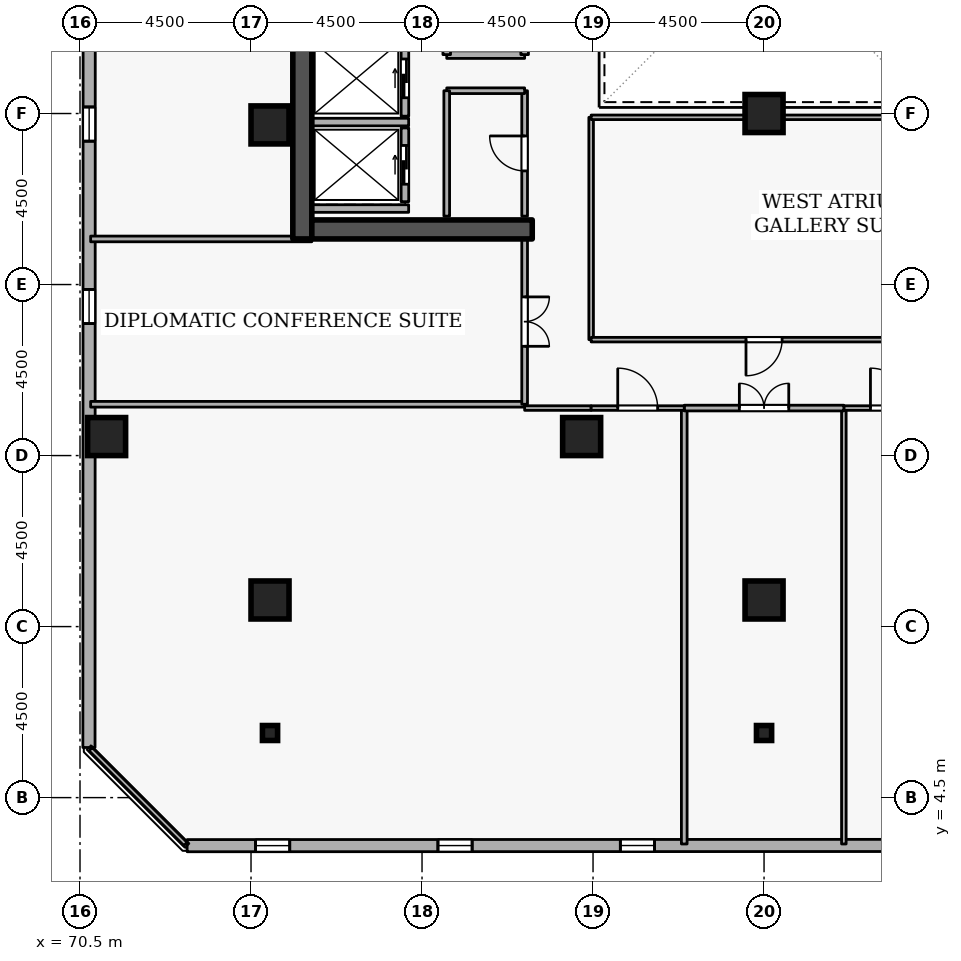
"""IFC4 building model, lengths in metres.
Left out: names, types, materials, properties, quantities, classifications, styles, units other than length and angle.
Written with IfcOpenShell. Run it as: python <this file> out.ifc"""

import sys

from ifc_helpers import new_model, si_unit, direction, frame, frame_2d, origin, origin_2d, place, context, subcontext, project, spatial, rectangle, i_section, extrude, element, fill, save


model = new_model("IFC4")
c1 = context("Model", 3, precision=1e-05, world=origin(), true_north=direction((0.0, 1.0)))
c2 = subcontext(c1, "Body", "Model", "MODEL_VIEW")
j1 = project(units=[si_unit("LENGTHUNIT", "METRE"), si_unit("PLANEANGLEUNIT", "RADIAN")], contexts=[c1])
p1 = place(None, origin())
s1 = spatial("IfcSite", under=j1, at=p1, CompositionType="ELEMENT")
p2 = place(p1, origin())
s2 = spatial("IfcBuilding", under=s1, at=p2, CompositionType="ELEMENT")
p3 = place(p2, frame((0.0, 0.0, 233.1)))
s3 = spatial("IfcBuildingStorey", under=s2, at=p3, CompositionType="ELEMENT", Elevation=233.1)
p4 = place(p3, frame((76.35, 19.2, 0.0), z_axis=(0.0, 0.0, 1.0), x_axis=(0.0, 1.0, 0.0)))
e1 = element("IfcWall", 1, at=p4, inside=s3, PredefinedType="SHEAR", context=c2, shape_type="SweptSolid", body=[
    extrude(rectangle(XDim=15.6, YDim=0.5, at=frame_2d((7.8, 0.0))), origin(), (0.0, 0.0, 1.0), 3.6),
])
p5 = place(p3, frame((76.6, 19.45, 0.0), z_axis=(0.0, 0.0, 1.0), x_axis=(1.0, 0.0, 0.0)))
e2 = element("IfcWall", 2, at=p5, inside=s3, PredefinedType="SHEAR", context=c2, shape_type="SweptSolid", body=[
    extrude(rectangle(XDim=5.8, YDim=0.5, at=frame_2d((2.9, 0.0))), origin(), (0.0, 0.0, 1.0), 3.6),
])
for number, where, z_axis, x_axis in (
    (3, (71.2, 14.0, 0.0), (0.0, 0.0, 1.0), (1.0, 0.0, 0.0)),
    (4, (88.5, 9.7, 0.0), (0.0, 0.0, 1.0), (1.0, 0.0, 0.0)),
    (5, (75.5, 9.7, 0.0), (0.0, 0.0, 1.0), (1.0, 0.0, 0.0)),
    (6, (83.7, 14.0, 0.0), (0.0, 0.0, 1.0), (1.0, 0.0, 0.0)),
    (7, (75.5, 22.2, 0.0), (0.0, 0.0, 1.0), (1.0, 0.0, 0.0)),
    (8, (88.5, 22.5, 0.0), (0.0, 0.0, 1.0), (1.0, 0.0, 0.0)),
):
    element("IfcColumn", number, at=place(p3, frame(where, z_axis=z_axis, x_axis=x_axis)), inside=s3, PredefinedType="COLUMN", context=c2, shape_type="SweptSolid", body=[
        extrude(rectangle(XDim=1.0, YDim=1.0, at=origin_2d()), origin(), (0.0, 0.0, 1.0), 3.6),
    ])
for number, where, z_axis, x_axis in (
    (9, (88.5, 6.2, 0.0), (0.0, 0.0, 1.0), (1.0, 0.0, 0.0)),
    (10, (75.5, 6.2, 0.0), (0.0, 0.0, 1.0), (1.0, 0.0, 0.0)),
):
    element("IfcColumn", number, at=place(p3, frame(where, z_axis=z_axis, x_axis=x_axis)), inside=s3, PredefinedType="COLUMN", context=c2, shape_type="SweptSolid", body=[
        extrude(i_section(OverallWidth=0.399, OverallDepth=0.394, WebThickness=0.023, FlangeThickness=0.037, FilletRadius=0.015, at=origin_2d()), origin(), (0.0, 0.0, 1.0), 3.6),
    ])
p6 = place(p3, frame((73.319, 3.235, 0.0), z_axis=(0.0, 0.0, 1.0), x_axis=(0.999999944762, 0.000332378036, 0.0)))
e11 = element("IfcWall", 11, at=p6, inside=s3, PredefinedType="STANDARD", context=c2, shape_type="SweptSolid", body=[
    extrude(rectangle(XDim=33.054, YDim=0.32, at=frame_2d((16.527, 0.0))), origin(), (0.0, 0.0, 1.0), 2.7),
])
p7 = place(p6, frame((1.8, 0.0, 0.72)))
e12 = element("IfcOpeningElement", 12, at=p7, cuts=e11, PredefinedType="OPENING", context=c2, shape_type="SweptSolid", body=[
    extrude(rectangle(XDim=0.9, YDim=1.75, at=frame_2d((0.45, 0.875))), frame((0.0, 0.17, 0.0), z_axis=(0.0, -1.0, 0.0), x_axis=(1.0, 0.0, 0.0)), (0.0, 0.0, 1.0), 0.34),
])
p8 = place(p6, frame((6.6, 0.0, 0.72)))
e13 = element("IfcOpeningElement", 13, at=p8, cuts=e11, PredefinedType="OPENING", context=c2, shape_type="SweptSolid", body=[
    extrude(rectangle(XDim=0.9, YDim=1.75, at=frame_2d((0.45, 0.875))), frame((0.0, 0.17, 0.0), z_axis=(0.0, -1.0, 0.0), x_axis=(1.0, 0.0, 0.0)), (0.0, 0.0, 1.0), 0.34),
])
p9 = place(p6, frame((11.4, 0.0, 0.72)))
e14 = element("IfcOpeningElement", 14, at=p9, cuts=e11, PredefinedType="OPENING", context=c2, shape_type="SweptSolid", body=[
    extrude(rectangle(XDim=0.9, YDim=1.75, at=frame_2d((0.45, 0.875))), frame((0.0, 0.17, 0.0), z_axis=(0.0, -1.0, 0.0), x_axis=(1.0, 0.0, 0.0)), (0.0, 0.0, 1.0), 0.34),
])
p10 = place(p6, frame((21.0, 0.0, 0.72)))
e15 = element("IfcOpeningElement", 15, at=p10, cuts=e11, PredefinedType="OPENING", context=c2, shape_type="SweptSolid", body=[
    extrude(rectangle(XDim=0.9, YDim=1.75, at=frame_2d((0.45, 0.875))), frame((0.0, 0.17, 0.0), z_axis=(0.0, -1.0, 0.0), x_axis=(1.0, 0.0, 0.0)), (0.0, 0.0, 1.0), 0.34),
])
p11 = place(p6, frame((25.8, 0.0, 0.72)))
e16 = element("IfcOpeningElement", 16, at=p11, cuts=e11, PredefinedType="OPENING", context=c2, shape_type="SweptSolid", body=[
    extrude(rectangle(XDim=0.9, YDim=1.75, at=frame_2d((0.45, 0.875))), frame((0.0, 0.17, 0.0), z_axis=(0.0, -1.0, 0.0), x_axis=(1.0, 0.0, 0.0)), (0.0, 0.0, 1.0), 0.34),
])
p12 = place(p3, frame((70.746, 38.872, 0.0), z_axis=(0.0, 0.0, 1.0), x_axis=(-0.000332378036, -0.999999944762, 0.0)))
e17 = element("IfcWall", 17, at=p12, inside=s3, PredefinedType="STANDARD", context=c2, shape_type="SweptSolid", body=[
    extrude(rectangle(XDim=33.054, YDim=0.32, at=frame_2d((16.527, 0.0))), origin(), (0.0, 0.0, 1.0), 2.7),
])
p13 = place(p12, frame((1.8, 0.0, 0.72)))
e18 = element("IfcOpeningElement", 18, at=p13, cuts=e17, PredefinedType="OPENING", context=c2, shape_type="SweptSolid", body=[
    extrude(rectangle(XDim=0.9, YDim=1.75, at=frame_2d((0.45, 0.875))), frame((0.0, 0.17, 0.0), z_axis=(0.0, -1.0, 0.0), x_axis=(1.0, 0.0, 0.0)), (0.0, 0.0, 1.0), 0.34),
])
p14 = place(p12, frame((6.6, 0.0, 0.72)))
e19 = element("IfcOpeningElement", 19, at=p14, cuts=e17, PredefinedType="OPENING", context=c2, shape_type="SweptSolid", body=[
    extrude(rectangle(XDim=0.9, YDim=1.75, at=frame_2d((0.45, 0.875))), frame((0.0, 0.17, 0.0), z_axis=(0.0, -1.0, 0.0), x_axis=(1.0, 0.0, 0.0)), (0.0, 0.0, 1.0), 0.34),
])
p15 = place(p12, frame((16.2, 0.0, 0.72)))
e20 = element("IfcOpeningElement", 20, at=p15, cuts=e17, PredefinedType="OPENING", context=c2, shape_type="SweptSolid", body=[
    extrude(rectangle(XDim=0.9, YDim=1.75, at=frame_2d((0.45, 0.875))), frame((0.0, 0.17, 0.0), z_axis=(0.0, -1.0, 0.0), x_axis=(1.0, 0.0, 0.0)), (0.0, 0.0, 1.0), 0.34),
])
p16 = place(p12, frame((21.0, 0.0, 0.72)))
e21 = element("IfcOpeningElement", 21, at=p16, cuts=e17, PredefinedType="OPENING", context=c2, shape_type="SweptSolid", body=[
    extrude(rectangle(XDim=0.9, YDim=1.75, at=frame_2d((0.45, 0.875))), frame((0.0, 0.17, 0.0), z_axis=(0.0, -1.0, 0.0), x_axis=(1.0, 0.0, 0.0)), (0.0, 0.0, 1.0), 0.34),
])
p17 = place(p3, frame((79.05, 22.43, 0.0), z_axis=(0.0, 0.0, 1.0), x_axis=(0.0, 1.0, 0.0)))
e22 = element("IfcWall", 22, at=p17, inside=s3, PredefinedType="STANDARD", context=c2, shape_type="SweptSolid", body=[
    extrude(rectangle(XDim=1.99, YDim=0.2, at=frame_2d((0.995, 0.0))), origin(), (0.0, 0.0, 1.0), 3.34),
])
p18 = place(p17, frame((0.485, 0.0, 0.0)))
e23 = element("IfcOpeningElement", 23, at=p18, cuts=e22, PredefinedType="OPENING", context=c2, shape_type="SweptSolid", body=[
    extrude(rectangle(XDim=1.02, YDim=2.06, at=frame_2d((0.51, 1.03))), frame((0.0, 0.11, 0.0), z_axis=(0.0, -1.0, 0.0), x_axis=(1.0, 0.0, 0.0)), (0.0, 0.0, 1.0), 0.22),
])
p19 = place(p3, frame((79.05, 20.18, 0.0), z_axis=(0.0, 0.0, 1.0), x_axis=(0.0, 1.0, 0.0)))
e24 = element("IfcWall", 24, at=p19, inside=s3, PredefinedType="STANDARD", context=c2, shape_type="SweptSolid", body=[
    extrude(rectangle(XDim=1.94, YDim=0.2, at=frame_2d((0.97, 0.0))), origin(), (0.0, 0.0, 1.0), 3.34),
])
p20 = place(p19, frame((0.46, 0.0, 0.0)))
e25 = element("IfcOpeningElement", 25, at=p20, cuts=e24, PredefinedType="OPENING", context=c2, shape_type="SweptSolid", body=[
    extrude(rectangle(XDim=1.02, YDim=2.06, at=frame_2d((0.51, 1.03))), frame((0.0, 0.11, 0.0), z_axis=(0.0, -1.0, 0.0), x_axis=(1.0, 0.0, 0.0)), (0.0, 0.0, 1.0), 0.22),
])
for number, where, z_axis, x_axis in (
    (26, (76.612, 22.275, 0.0), (0.0, 0.0, 1.0), (1.0, 0.0, 0.0)),
    (27, (76.612, 20.0, 0.0), (0.0, 0.0, 1.0), (1.0, 0.0, 0.0)),
):
    element("IfcWall", number, at=place(p3, frame(where, z_axis=z_axis, x_axis=x_axis)), inside=s3, PredefinedType="STANDARD", context=c2, shape_type="SweptSolid", body=[
        extrude(rectangle(XDim=2.536, YDim=0.2, at=frame_2d((1.268, 0.0))), origin(), (0.0, 0.0, 1.0), 3.34),
    ])
p21 = place(p3, frame((80.15, 24.05, 0.0), z_axis=(0.0, 0.0, 1.0), x_axis=(1.0, 0.0, 0.0)))
e28 = element("IfcWall", 28, at=p21, inside=s3, PredefinedType="STANDARD", context=c2, shape_type="SweptSolid", body=[
    extrude(rectangle(XDim=2.05, YDim=0.2, at=frame_2d((1.025, 0.0))), origin(), (0.0, 0.0, 1.0), 3.34),
])
p22 = place(p3, frame((82.2, 24.05, 0.0), z_axis=(0.0, 0.0, 1.0), x_axis=(0.0, 1.0, 0.0)))
e29 = element("IfcWall", 29, at=p22, inside=s3, PredefinedType="STANDARD", context=c2, shape_type="SweptSolid", body=[
    extrude(rectangle(XDim=1.8, YDim=0.2, at=frame_2d((0.9, 0.0))), origin(), (0.0, 0.0, 1.0), 3.34),
])
p23 = place(p22, frame((0.46, 0.0, 0.0)))
e30 = element("IfcOpeningElement", 30, at=p23, cuts=e29, PredefinedType="OPENING", context=c2, shape_type="SweptSolid", body=[
    extrude(rectangle(XDim=0.88, YDim=2.04, at=frame_2d((0.44, 1.02))), frame((0.0, 0.11, 0.0), z_axis=(0.0, -1.0, 0.0), x_axis=(1.0, 0.0, 0.0)), (0.0, 0.0, 1.0), 0.22),
])
p24 = place(p3, frame((80.15, 25.85, 0.0), z_axis=(0.0, 0.0, 1.0), x_axis=(0.0, -1.0, 0.0)))
e31 = element("IfcWall", 31, at=p24, inside=s3, PredefinedType="STANDARD", context=c2, shape_type="SweptSolid", body=[
    extrude(rectangle(XDim=1.8, YDim=0.2, at=frame_2d((0.9, 0.0))), origin(), (0.0, 0.0, 1.0), 3.34),
])
p25 = place(p3, frame((82.2, 19.8, 0.0), z_axis=(0.0, 0.0, 1.0), x_axis=(0.0, 1.0, 0.0)))
e32 = element("IfcWall", 32, at=p25, inside=s3, PredefinedType="PARTITIONING", context=c2, shape_type="SweptSolid", body=[
    extrude(rectangle(XDim=3.3, YDim=0.15, at=frame_2d((1.65, 0.0))), origin(), (0.0, 0.0, 1.0), 3.34),
])
p26 = place(p25, frame((1.19, 0.0, 0.0)))
e33 = element("IfcOpeningElement", 33, at=p26, cuts=e32, PredefinedType="OPENING", context=c2, shape_type="SweptSolid", body=[
    extrude(rectangle(XDim=0.92, YDim=2.08, at=frame_2d((0.46, 1.04))), frame((0.0, 0.085, 0.0), z_axis=(0.0, -1.0, 0.0), x_axis=(1.0, 0.0, 0.0)), (0.0, 0.0, 1.0), 0.17),
])
p27 = place(p3, frame((82.2, 23.1, 0.0), z_axis=(0.0, 0.0, 1.0), x_axis=(-1.0, 0.0, 0.0)))
e34 = element("IfcWall", 34, at=p27, inside=s3, PredefinedType="PARTITIONING", context=c2, shape_type="SweptSolid", body=[
    extrude(rectangle(XDim=2.05, YDim=0.15, at=frame_2d((1.025, 0.0))), origin(), (0.0, 0.0, 1.0), 3.34),
])
p28 = place(p3, frame((80.15, 23.1, 0.0), z_axis=(0.0, 0.0, 1.0), x_axis=(0.0, -1.0, 0.0)))
e35 = element("IfcWall", 35, at=p28, inside=s3, PredefinedType="PARTITIONING", context=c2, shape_type="SweptSolid", body=[
    extrude(rectangle(XDim=3.3, YDim=0.15, at=frame_2d((1.65, 0.0))), origin(), (0.0, 0.0, 1.0), 3.34),
])
p29 = place(p3, frame((82.2, 14.85, 0.0), z_axis=(0.0, 0.0, 1.0), x_axis=(-1.0, 0.0, 0.0)))
e36 = element("IfcWall", 36, at=p29, inside=s3, PredefinedType="PARTITIONING", context=c2, shape_type="SweptSolid", body=[
    extrude(rectangle(XDim=11.42, YDim=0.15, at=frame_2d((5.71, 0.0))), origin(), (0.0, 0.0, 1.0), 3.34),
])
p30 = place(p3, frame((70.78, 19.2, 0.0), z_axis=(0.0, 0.0, 1.0), x_axis=(1.0, 0.0, 0.0)))
e37 = element("IfcWall", 37, at=p30, inside=s3, PredefinedType="PARTITIONING", context=c2, shape_type="SweptSolid", body=[
    extrude(rectangle(XDim=5.82, YDim=0.15, at=frame_2d((2.91, 0.0))), origin(), (0.0, 0.0, 1.0), 2.545),
])
p31 = place(p3, frame((82.2, 19.2, 0.0), z_axis=(0.0, 0.0, 1.0), x_axis=(0.0, -1.0, 0.0)))
e38 = element("IfcWall", 38, at=p31, inside=s3, PredefinedType="PARTITIONING", context=c2, shape_type="SweptSolid", body=[
    extrude(rectangle(XDim=4.35, YDim=0.15, at=frame_2d((2.175, 0.0))), origin(), (0.0, 0.0, 1.0), 3.34),
])
p32 = place(p31, frame((1.525, 0.0, 0.0)))
e39 = element("IfcOpeningElement", 39, at=p32, cuts=e38, PredefinedType="OPENING", context=c2, shape_type="SweptSolid", body=[
    extrude(rectangle(XDim=1.3, YDim=2.12, at=frame_2d((0.65, 1.06))), frame((0.0, 0.085, 0.0), z_axis=(0.0, -1.0, 0.0), x_axis=(1.0, 0.0, 0.0)), (0.0, 0.0, 1.0), 0.17),
])
p33 = place(p3, frame((90.6, 3.28, 0.0), z_axis=(0.0, 0.0, 1.0), x_axis=(0.0, 1.0, 0.0)))
e40 = element("IfcWall", 40, at=p33, inside=s3, PredefinedType="PARTITIONING", context=c2, shape_type="SweptSolid", body=[
    extrude(rectangle(XDim=11.47, YDim=0.12, at=frame_2d((5.735, 0.0))), origin(), (0.0, 0.0, 1.0), 3.34),
])
p34 = place(p3, frame((90.6, 14.75, 0.0), z_axis=(0.0, 0.0, 1.0), x_axis=(1.0, 0.0, 0.0)))
e41 = element("IfcWall", 41, at=p34, inside=s3, PredefinedType="PARTITIONING", context=c2, shape_type="SweptSolid", body=[
    extrude(rectangle(XDim=2.45, YDim=0.12, at=frame_2d((1.225, 0.0))), origin(), (0.0, 0.0, 1.0), 3.34),
])
p35 = place(p34, frame((0.7, 0.0, 0.0)))
e42 = element("IfcOpeningElement", 42, at=p35, cuts=e41, PredefinedType="OPENING", context=c2, shape_type="SweptSolid", body=[
    extrude(rectangle(XDim=1.05, YDim=2.1, at=frame_2d((0.525, 1.05))), frame((0.0, 0.07, 0.0), z_axis=(0.0, -1.0, 0.0), x_axis=(1.0, 0.0, 0.0)), (0.0, 0.0, 1.0), 0.14),
])
p36 = place(p3, frame((86.4, 3.28, 0.0), z_axis=(0.0, 0.0, 1.0), x_axis=(0.0, 1.0, 0.0)))
e43 = element("IfcWall", 43, at=p36, inside=s3, PredefinedType="PARTITIONING", context=c2, shape_type="SweptSolid", body=[
    extrude(rectangle(XDim=11.47, YDim=0.15, at=frame_2d((5.735, 0.0))), origin(), (0.0, 0.0, 1.0), 3.34),
])
p37 = place(p3, frame((86.4, 14.75, 0.0), z_axis=(0.0, 0.0, 1.0), x_axis=(1.0, 0.0, 0.0)))
e44 = element("IfcWall", 44, at=p37, inside=s3, PredefinedType="PARTITIONING", context=c2, shape_type="SweptSolid", body=[
    extrude(rectangle(XDim=4.2, YDim=0.15, at=frame_2d((2.1, 0.0))), origin(), (0.0, 0.0, 1.0), 3.34),
])
p38 = place(p37, frame((1.45, 0.0, 0.0)))
e45 = element("IfcOpeningElement", 45, at=p38, cuts=e44, PredefinedType="OPENING", context=c2, shape_type="SweptSolid", body=[
    extrude(rectangle(XDim=1.3, YDim=2.12, at=frame_2d((0.65, 1.06))), frame((0.0, 0.085, 0.0), z_axis=(0.0, -1.0, 0.0), x_axis=(1.0, 0.0, 0.0)), (0.0, 0.0, 1.0), 0.17),
])
p39 = place(p3, frame((73.275, 3.28, 0.0), z_axis=(0.0, 0.0, 1.0), x_axis=(-0.707106781187, 0.707106781187, 0.0)))
e46 = element("IfcWall", 46, at=p39, inside=s3, PredefinedType="PARTITIONING", context=c2, shape_type="SweptSolid", body=[
    extrude(rectangle(XDim=3.528, YDim=0.12, at=frame_2d((1.764, 0.0))), origin(), (0.0, 0.0, 1.0), 3.34),
])
p40 = place(p3, frame((82.2, 14.75, 0.0), z_axis=(0.0, 0.0, 1.0), x_axis=(1.0, 0.0, 0.0)))
e47 = element("IfcWall", 47, at=p40, inside=s3, PredefinedType="PARTITIONING", context=c2, shape_type="SweptSolid", body=[
    extrude(rectangle(XDim=1.75, YDim=0.12, at=frame_2d((0.875, 0.0))), origin(), (0.0, 0.0, 1.0), 3.34),
])
p41 = place(p3, frame((83.95, 14.75, 0.0), z_axis=(0.0, 0.0, 1.0), x_axis=(1.0, 0.0, 0.0)))
e48 = element("IfcWall", 48, at=p41, inside=s3, PredefinedType="PARTITIONING", context=c2, shape_type="SweptSolid", body=[
    extrude(rectangle(XDim=2.45, YDim=0.12, at=frame_2d((1.225, 0.0))), origin(), (0.0, 0.0, 1.0), 3.34),
])
p42 = place(p41, frame((0.7, 0.0, 0.0)))
e49 = element("IfcOpeningElement", 49, at=p42, cuts=e48, PredefinedType="OPENING", context=c2, shape_type="SweptSolid", body=[
    extrude(rectangle(XDim=1.05, YDim=2.1, at=frame_2d((0.525, 1.05))), frame((0.0, 0.07, 0.0), z_axis=(0.0, -1.0, 0.0), x_axis=(1.0, 0.0, 0.0)), (0.0, 0.0, 1.0), 0.14),
])
p43 = place(p3, frame((83.95, 16.55, 0.0), z_axis=(0.0, 0.0, 1.0), x_axis=(0.0, 1.0, 0.0)))
e50 = element("IfcWall", 50, at=p43, inside=s3, PredefinedType="PARTITIONING", context=c2, shape_type="SweptSolid", body=[
    extrude(rectangle(XDim=5.85, YDim=0.12, at=frame_2d((2.925, 0.0))), origin(), (0.0, 0.0, 1.0), 3.34),
])
p44 = place(p3, frame((83.95, 22.4, 0.0), z_axis=(0.0, 0.0, 1.0), x_axis=(1.0, 0.0, 0.0)))
e51 = element("IfcWall", 51, at=p44, inside=s3, PredefinedType="PARTITIONING", context=c2, shape_type="SweptSolid", body=[
    extrude(rectangle(XDim=9.1, YDim=0.12, at=frame_2d((4.55, 0.0))), origin(), (0.0, 0.0, 1.0), 3.34),
])
p45 = place(p3, frame((93.05, 16.55, 0.0), z_axis=(0.0, 0.0, 1.0), x_axis=(-1.0, 0.0, 0.0)))
e52 = element("IfcWall", 52, at=p45, inside=s3, PredefinedType="PARTITIONING", context=c2, shape_type="SweptSolid", body=[
    extrude(rectangle(XDim=9.1, YDim=0.12, at=frame_2d((4.55, 0.0))), origin(), (0.0, 0.0, 1.0), 3.34),
])
p46 = place(p45, frame((4.075, 0.0, 0.0)))
e53 = element("IfcOpeningElement", 53, at=p46, cuts=e52, PredefinedType="OPENING", context=c2, shape_type="SweptSolid", body=[
    extrude(rectangle(XDim=0.95, YDim=2.1, at=frame_2d((0.475, 1.05))), frame((0.0, 0.07, 0.0), z_axis=(0.0, -1.0, 0.0), x_axis=(1.0, 0.0, 0.0)), (0.0, 0.0, 1.0), 0.14),
])
p47 = place(p7, origin())
e54 = element("IfcWindow", 54, at=p47, inside=s3, PartitioningType="SINGLE_PANEL", PredefinedType="WINDOW", context=c2, shape_type="SweptSolid", body=[
    extrude(rectangle(XDim=0.9, YDim=1.75, at=frame_2d((0.45, 0.875))), frame((0.0, 0.03, 0.0), z_axis=(0.0, -1.0, 0.0), x_axis=(1.0, 0.0, 0.0)), (0.0, 0.0, 1.0), 0.06),
])
fill(e12, e54)
p48 = place(p8, origin())
e55 = element("IfcWindow", 55, at=p48, inside=s3, PartitioningType="SINGLE_PANEL", PredefinedType="WINDOW", context=c2, shape_type="SweptSolid", body=[
    extrude(rectangle(XDim=0.9, YDim=1.75, at=frame_2d((0.45, 0.875))), frame((0.0, 0.03, 0.0), z_axis=(0.0, -1.0, 0.0), x_axis=(1.0, 0.0, 0.0)), (0.0, 0.0, 1.0), 0.06),
])
fill(e13, e55)
p49 = place(p9, origin())
e56 = element("IfcWindow", 56, at=p49, inside=s3, PartitioningType="SINGLE_PANEL", PredefinedType="WINDOW", context=c2, shape_type="SweptSolid", body=[
    extrude(rectangle(XDim=0.9, YDim=1.75, at=frame_2d((0.45, 0.875))), frame((0.0, 0.03, 0.0), z_axis=(0.0, -1.0, 0.0), x_axis=(1.0, 0.0, 0.0)), (0.0, 0.0, 1.0), 0.06),
])
fill(e14, e56)
p50 = place(p15, origin())
e57 = element("IfcWindow", 57, at=p50, inside=s3, PartitioningType="SINGLE_PANEL", PredefinedType="WINDOW", context=c2, shape_type="SweptSolid", body=[
    extrude(rectangle(XDim=0.9, YDim=1.75, at=frame_2d((0.45, 0.875))), frame((0.0, 0.03, 0.0), z_axis=(0.0, -1.0, 0.0), x_axis=(1.0, 0.0, 0.0)), (0.0, 0.0, 1.0), 0.06),
])
fill(e20, e57)
p51 = place(p16, origin())
e58 = element("IfcWindow", 58, at=p51, inside=s3, PartitioningType="SINGLE_PANEL", PredefinedType="WINDOW", context=c2, shape_type="SweptSolid", body=[
    extrude(rectangle(XDim=0.9, YDim=1.75, at=frame_2d((0.45, 0.875))), frame((0.0, 0.03, 0.0), z_axis=(0.0, -1.0, 0.0), x_axis=(1.0, 0.0, 0.0)), (0.0, 0.0, 1.0), 0.06),
])
fill(e21, e58)
p52 = place(p18, origin())
e59 = element("IfcDoor", 59, at=p52, inside=s3, OperationType="SLIDING_TO_LEFT", PredefinedType="DOOR", context=c2, shape_type="SweptSolid", body=[
    extrude(rectangle(XDim=1.02, YDim=2.06, at=frame_2d((0.51, 1.03))), frame((0.0, 0.025, 0.0), z_axis=(0.0, -1.0, 0.0), x_axis=(1.0, 0.0, 0.0)), (0.0, 0.0, 1.0), 0.05),
])
fill(e23, e59)
p53 = place(p20, origin())
e60 = element("IfcDoor", 60, at=p53, inside=s3, OperationType="SLIDING_TO_LEFT", PredefinedType="DOOR", context=c2, shape_type="SweptSolid", body=[
    extrude(rectangle(XDim=1.02, YDim=2.06, at=frame_2d((0.51, 1.03))), frame((0.0, 0.025, 0.0), z_axis=(0.0, -1.0, 0.0), x_axis=(1.0, 0.0, 0.0)), (0.0, 0.0, 1.0), 0.05),
])
fill(e25, e60)
p54 = place(p26, origin())
e61 = element("IfcDoor", 61, at=p54, inside=s3, OperationType="SINGLE_SWING_RIGHT", PredefinedType="DOOR", context=c2, shape_type="SweptSolid", body=[
    extrude(rectangle(XDim=0.92, YDim=2.08, at=frame_2d((0.46, 1.04))), frame((0.0, 0.025, 0.0), z_axis=(0.0, -1.0, 0.0), x_axis=(1.0, 0.0, 0.0)), (0.0, 0.0, 1.0), 0.05),
])
fill(e33, e61)
p55 = place(p32, origin())
e62 = element("IfcDoor", 62, at=p55, inside=s3, OperationType="DOUBLE_DOOR_SINGLE_SWING", PredefinedType="DOOR", context=c2, shape_type="SweptSolid", body=[
    extrude(rectangle(XDim=1.3, YDim=2.12, at=frame_2d((0.65, 1.06))), frame((0.0, 0.025, 0.0), z_axis=(0.0, -1.0, 0.0), x_axis=(1.0, 0.0, 0.0)), (0.0, 0.0, 1.0), 0.05),
])
fill(e39, e62)
p56 = place(p35, origin())
e63 = element("IfcDoor", 63, at=p56, inside=s3, OperationType="SINGLE_SWING_LEFT", PredefinedType="DOOR", context=c2, shape_type="SweptSolid", body=[
    extrude(rectangle(XDim=1.05, YDim=2.1, at=frame_2d((0.525, 1.05))), frame((0.0, 0.025, 0.0), z_axis=(0.0, -1.0, 0.0), x_axis=(1.0, 0.0, 0.0)), (0.0, 0.0, 1.0), 0.05),
])
fill(e42, e63)
p57 = place(p38, origin())
e64 = element("IfcDoor", 64, at=p57, inside=s3, OperationType="DOUBLE_DOOR_SINGLE_SWING", PredefinedType="DOOR", context=c2, shape_type="SweptSolid", body=[
    extrude(rectangle(XDim=1.3, YDim=2.12, at=frame_2d((0.65, 1.06))), frame((0.0, 0.025, 0.0), z_axis=(0.0, -1.0, 0.0), x_axis=(1.0, 0.0, 0.0)), (0.0, 0.0, 1.0), 0.05),
])
fill(e45, e64)
p58 = place(p42, origin())
e65 = element("IfcDoor", 65, at=p58, inside=s3, OperationType="SINGLE_SWING_LEFT", PredefinedType="DOOR", context=c2, shape_type="SweptSolid", body=[
    extrude(rectangle(XDim=1.05, YDim=2.1, at=frame_2d((0.525, 1.05))), frame((0.0, 0.025, 0.0), z_axis=(0.0, -1.0, 0.0), x_axis=(1.0, 0.0, 0.0)), (0.0, 0.0, 1.0), 0.05),
])
fill(e49, e65)
p59 = place(p46, origin())
e66 = element("IfcDoor", 66, at=p59, inside=s3, OperationType="SINGLE_SWING_RIGHT", PredefinedType="DOOR", context=c2, shape_type="SweptSolid", body=[
    extrude(rectangle(XDim=0.95, YDim=2.1, at=frame_2d((0.475, 1.05))), frame((0.0, 0.025, 0.0), z_axis=(0.0, -1.0, 0.0), x_axis=(1.0, 0.0, 0.0)), (0.0, 0.0, 1.0), 0.05),
])
fill(e53, e66)
save(model, sys.argv[1])
